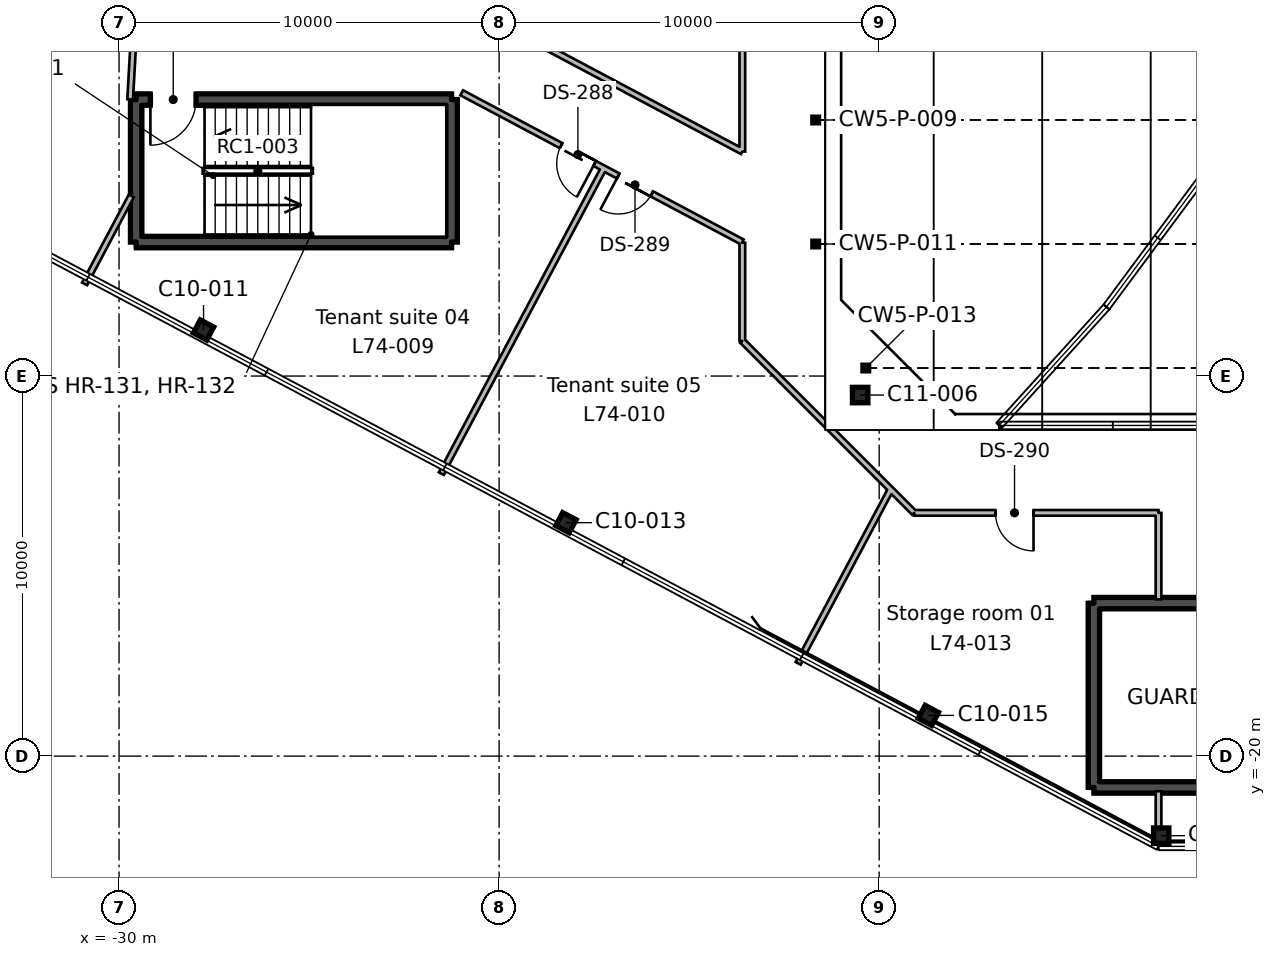
"""IFC4 building model, lengths in metres.
Left out: names, types, materials, properties, quantities, classifications, styles, units other than length and angle.
Written with IfcOpenShell. Run it as: python <this file> out.ifc"""

import sys

from ifc_helpers import new_model, si_unit, direction, frame, frame_2d, origin, origin_2d, place, context, subcontext, project, spatial, rectangle, hollow_rectangle, i_section, extrude, element, fill, save


model = new_model("IFC4")
c1 = context("Model", 3, precision=1e-05, world=origin(), true_north=direction((0.0, 1.0)))
c2 = subcontext(c1, "Body", "Model", "MODEL_VIEW")
j1 = project(units=[si_unit("LENGTHUNIT", "METRE"), si_unit("PLANEANGLEUNIT", "RADIAN")], contexts=[c1])
p1 = place(None, origin())
s1 = spatial("IfcSite", under=j1, at=p1, CompositionType="ELEMENT")
p2 = place(p1, origin())
s2 = spatial("IfcBuilding", under=s1, at=p2, CompositionType="ELEMENT")
p3 = place(p2, frame((0.0, 0.0, 324.3)))
s3 = spatial("IfcBuildingStorey", under=s2, at=p3, CompositionType="ELEMENT", Elevation=324.3)
p4 = place(p3, frame((-2.579, -22.094, 0.0), z_axis=(0.0, 0.0, 1.0), x_axis=(1.0, 0.0, 0.0)))
e1 = element("IfcColumn", 1, at=p4, inside=s3, PredefinedType="COLUMN", context=c2, shape_type="SweptSolid", body=[
    extrude(i_section(OverallWidth=0.404, OverallDepth=0.406, WebThickness=0.027, FlangeThickness=0.044, FilletRadius=0.015, at=origin_2d()), origin(), (0.0, 0.0, 1.0), 3.9),
])
for number, where, z_axis, x_axis in (
    (2, (-8.705, -18.929, 0.0), (0.0, 0.0, 1.0), (0.883, -0.469, 0.0)),
    (3, (-18.241, -13.858, 0.0), (0.0, 0.0, 1.0), (0.883, -0.469, 0.0)),
):
    element("IfcColumn", number, at=place(p3, frame(where, z_axis=z_axis, x_axis=x_axis)), inside=s3, PredefinedType="COLUMN", context=c2, shape_type="SweptSolid", body=[
        extrude(i_section(OverallWidth=0.399, OverallDepth=0.386, WebThickness=0.021, FlangeThickness=0.033, FilletRadius=0.015, at=origin_2d()), origin(), (0.0, 0.0, 1.0), 3.9),
    ])
p5 = place(p3, frame((-10.5, -10.5, 0.0), z_axis=(0.0, 0.0, 1.0), x_axis=(1.0, 0.0, 0.0)))
e4 = element("IfcColumn", 4, at=p5, inside=s3, PredefinedType="COLUMN", context=c2, shape_type="SweptSolid", body=[
    extrude(hollow_rectangle(XDim=0.406, YDim=0.406, WallThickness=0.009, InnerFilletRadius=0.004, OuterFilletRadius=0.013, at=origin_2d()), origin(), (0.0, 0.0, 1.0), 3.9),
])
p6 = place(p3, frame((-27.777, -8.788, 0.0), z_axis=(0.0, 0.0, 1.0), x_axis=(0.882947592859, -0.469471562786, 0.0)))
e5 = element("IfcColumn", 5, at=p6, inside=s3, PredefinedType="COLUMN", context=c2, shape_type="SweptSolid", body=[
    extrude(i_section(OverallWidth=0.399, OverallDepth=0.386, WebThickness=0.021, FlangeThickness=0.033, FilletRadius=0.015, at=origin_2d()), origin(), (0.0, 0.0, 1.0), 3.9),
])
p7 = place(p3, frame((3.95, -20.825, 0.0), z_axis=(0.0, 0.0, 1.0), x_axis=(-1.0, 0.0, 0.0)))
e6 = element("IfcWall", 6, at=p7, inside=s3, PredefinedType="SHEAR", context=c2, shape_type="SweptSolid", body=[
    extrude(rectangle(XDim=8.3, YDim=0.3, at=frame_2d((4.15, 0.0))), origin(), (0.0, 0.0, 1.0), 3.9),
])
p8 = place(p3, frame((-4.35, -20.825, 0.0), z_axis=(0.0, 0.0, 1.0), x_axis=(0.0, 1.0, 0.0)))
e7 = element("IfcWall", 7, at=p8, inside=s3, PredefinedType="SHEAR", context=c2, shape_type="SweptSolid", body=[
    extrude(rectangle(XDim=4.85, YDim=0.3, at=frame_2d((2.425, 0.0))), origin(), (0.0, 0.0, 1.0), 3.9),
])
p9 = place(p3, frame((-4.35, -15.975, 0.0), z_axis=(0.0, 0.0, 1.0), x_axis=(1.0, 0.0, 0.0)))
e8 = element("IfcWall", 8, at=p9, inside=s3, PredefinedType="SHEAR", context=c2, shape_type="SweptSolid", body=[
    extrude(rectangle(XDim=8.3, YDim=0.3, at=frame_2d((4.15, 0.0))), origin(), (0.0, 0.0, 1.0), 3.9),
])
p10 = place(p9, frame((6.05, 0.0, 0.0)))
e9 = element("IfcOpeningElement", 9, at=p10, cuts=e8, PredefinedType="OPENING", context=c2, shape_type="SweptSolid", body=[
    extrude(rectangle(XDim=1.9, YDim=2.1, at=frame_2d((0.95, 1.05))), frame((0.0, 0.16, 0.0), z_axis=(0.0, -1.0, 0.0), x_axis=(1.0, 0.0, 0.0)), (0.0, 0.0, 1.0), 0.32),
])
p11 = place(p3, frame((-21.25, -2.725, 0.0), z_axis=(0.0, 0.0, 1.0), x_axis=(0.0, -1.0, 0.0)))
e10 = element("IfcWall", 10, at=p11, inside=s3, PredefinedType="SHEAR", context=c2, shape_type="SweptSolid", body=[
    extrude(rectangle(XDim=3.75, YDim=0.3, at=frame_2d((1.875, 0.0))), origin(), (0.0, 0.0, 1.0), 3.9),
])
p12 = place(p3, frame((-21.25, -6.475, 0.0), z_axis=(0.0, 0.0, 1.0), x_axis=(-1.0, 0.0, 0.0)))
e11 = element("IfcWall", 11, at=p12, inside=s3, PredefinedType="SHEAR", context=c2, shape_type="SweptSolid", body=[
    extrude(rectangle(XDim=8.3, YDim=0.3, at=frame_2d((4.15, 0.0))), origin(), (0.0, 0.0, 1.0), 3.9),
])
p13 = place(p3, frame((-29.55, -6.475, 0.0), z_axis=(0.0, 0.0, 1.0), x_axis=(0.0, 1.0, 0.0)))
e12 = element("IfcWall", 12, at=p13, inside=s3, PredefinedType="SHEAR", context=c2, shape_type="SweptSolid", body=[
    extrude(rectangle(XDim=3.75, YDim=0.3, at=frame_2d((1.875, 0.0))), origin(), (0.0, 0.0, 1.0), 3.9),
])
p14 = place(p3, frame((-29.55, -2.725, 0.0), z_axis=(0.0, 0.0, 1.0), x_axis=(1.0, 0.0, 0.0)))
e13 = element("IfcWall", 13, at=p14, inside=s3, PredefinedType="SHEAR", context=c2, shape_type="SweptSolid", body=[
    extrude(rectangle(XDim=8.3, YDim=0.3, at=frame_2d((4.15, 0.0))), origin(), (0.0, 0.0, 1.0), 3.9),
])
p15 = place(p14, frame((0.375, 0.0, 0.0)))
e14 = element("IfcOpeningElement", 14, at=p15, cuts=e13, PredefinedType="OPENING", context=c2, shape_type="SweptSolid", body=[
    extrude(rectangle(XDim=1.2, YDim=2.1, at=frame_2d((0.6, 1.05))), frame((0.0, 0.16, 0.0), z_axis=(0.0, -1.0, 0.0), x_axis=(1.0, 0.0, 0.0)), (0.0, 0.0, 1.0), 0.32),
])
p16 = place(p3, frame((8.042, -11.1, 3.9), z_axis=(0.0, 0.0, 1.0), x_axis=(-1.0, 0.0, 0.0)))
e15 = element("IfcWall", 15, at=p16, inside=s3, PredefinedType="STANDARD", context=c2, shape_type="SweptSolid", body=[
    extrude(rectangle(XDim=14.435, YDim=0.2, at=frame_2d((7.217, 0.0))), origin(), (0.0, 0.0, 1.0), 1.1),
])
p17 = place(p3, frame((-6.393, -11.1, 3.9), z_axis=(0.0, 0.0, 1.0), x_axis=(0.671536110708, 0.740971829434, 0.0)))
e16 = element("IfcWall", 16, at=p17, inside=s3, PredefinedType="STANDARD", context=c2, shape_type="SweptSolid", body=[
    extrude(rectangle(XDim=3.766, YDim=0.2, at=frame_2d((1.883, 0.0))), origin(), (0.0, 0.0, 1.0), 1.1),
])
p18 = place(p3, frame((-3.865, -8.31, 3.9), z_axis=(0.0, 0.0, 1.0), x_axis=(0.595701892523, 0.80320561206, 0.0)))
e17 = element("IfcWall", 17, at=p18, inside=s3, PredefinedType="STANDARD", context=c2, shape_type="SweptSolid", body=[
    extrude(rectangle(XDim=4.553, YDim=0.2, at=frame_2d((2.277, 0.0))), origin(), (0.0, 0.0, 1.0), 1.1),
])
for number, where, z_axis, x_axis in (
    (18, (-10.351, -9.789, 3.9), (0.0, 0.0, 1.0), (1.0, 0.0, 0.0)),
    (19, (-11.67, -6.526, 3.9), (0.0, 0.0, 1.0), (1.0, 0.0, 0.0)),
    (20, (-11.67, -3.263, 3.9), (0.0, 0.0, 1.0), (1.0, 0.0, 0.0)),
):
    element("IfcColumn", number, at=place(p3, frame(where, z_axis=z_axis, x_axis=x_axis)), inside=s3, PredefinedType="COLUMN", context=c2, shape_type="SweptSolid", body=[
        extrude(hollow_rectangle(XDim=0.15, YDim=0.15, WallThickness=0.008, InnerFilletRadius=0.004, OuterFilletRadius=0.012, at=origin_2d()), origin(), (0.0, 0.0, 1.0), 2.45),
    ])
p19 = place(p3, frame((-29.677, -5.259, 0.0), z_axis=(0.0, 0.0, 1.0), x_axis=(-0.469186976584, -0.883098851207, 0.0)))
e21 = element("IfcWall", 21, at=p19, inside=s3, PredefinedType="PARTITIONING", context=c2, shape_type="SweptSolid", body=[
    extrude(rectangle(XDim=2.624, YDim=0.15, at=frame_2d((1.312, 0.0))), origin(), (0.0, 0.0, 1.0), 3.5),
])
p20 = place(p3, frame((-29.708, -2.721, 0.0), z_axis=(0.0, 0.0, 1.0), x_axis=(0.056209208886, 0.998419012658, 0.0)))
e22 = element("IfcWall", 22, at=p20, inside=s3, PredefinedType="PARTITIONING", context=c2, shape_type="SweptSolid", body=[
    extrude(rectangle(XDim=4.152, YDim=0.15, at=frame_2d((2.076, 0.0))), origin(), (0.0, 0.0, 1.0), 3.5),
])
p21 = place(p3, frame((-17.248, -4.533, 0.0), z_axis=(0.0, 0.0, 1.0), x_axis=(-0.46943766298, -0.882965616871, 0.0)))
e23 = element("IfcWall", 23, at=p21, inside=s3, PredefinedType="PARTITIONING", context=c2, shape_type="SweptSolid", body=[
    extrude(rectangle(XDim=9.1, YDim=0.15, at=frame_2d((4.55, 0.0))), origin(), (0.0, 0.0, 1.0), 3.5),
])
p22 = place(p3, frame((-13.6, -6.473, 0.0), z_axis=(0.0, 0.0, 1.0), x_axis=(-0.882934197132, 0.469496755618, 0.0)))
e24 = element("IfcWall", 24, at=p22, inside=s3, PredefinedType="PARTITIONING", context=c2, shape_type="SweptSolid", body=[
    extrude(rectangle(XDim=8.362, YDim=0.15, at=frame_2d((4.181, 0.0))), origin(), (0.0, 0.0, 1.0), 3.5),
])
p23 = place(p22, frame((4.4, 0.0, 0.0)))
e25 = element("IfcOpeningElement", 25, at=p23, cuts=e24, PredefinedType="OPENING", context=c2, shape_type="SweptSolid", body=[
    extrude(rectangle(XDim=1.0, YDim=2.1, at=frame_2d((0.5, 1.05))), frame((0.0, 0.085, 0.0), z_axis=(0.0, -1.0, 0.0), x_axis=(1.0, 0.0, 0.0)), (0.0, 0.0, 1.0), 0.17),
])
p24 = place(p22, frame((2.699, 0.0, 0.0)))
e26 = element("IfcOpeningElement", 26, at=p24, cuts=e24, PredefinedType="OPENING", context=c2, shape_type="SweptSolid", body=[
    extrude(rectangle(XDim=1.0, YDim=2.1, at=frame_2d((0.5, 1.05))), frame((0.0, 0.085, 0.0), z_axis=(0.0, -1.0, 0.0), x_axis=(1.0, 0.0, 0.0)), (0.0, 0.0, 1.0), 0.17),
])
p25 = place(p3, frame((-9.661, -13.016, 0.0), z_axis=(0.0, 0.0, 1.0), x_axis=(-0.707106781187, 0.707106781187, 0.0)))
e27 = element("IfcWall", 27, at=p25, inside=s3, PredefinedType="PARTITIONING", context=c2, shape_type="SweptSolid", body=[
    extrude(rectangle(XDim=5.571, YDim=0.15, at=frame_2d((2.785, 0.0))), origin(), (0.0, 0.0, 1.0), 3.5),
])
p26 = place(p3, frame((-13.6, -9.077, 0.0), z_axis=(0.0, 0.0, 1.0), x_axis=(0.0, 1.0, 0.0)))
e28 = element("IfcWall", 28, at=p26, inside=s3, PredefinedType="PARTITIONING", context=c2, shape_type="SweptSolid", body=[
    extrude(rectangle(XDim=2.586, YDim=0.15, at=frame_2d((1.293, 0.0))), origin(), (0.0, 0.0, 1.0), 3.5),
])
p27 = place(p3, frame((-9.696, -12.981, 0.0), z_axis=(0.0, 0.0, 1.0), x_axis=(-0.469664493403, -0.882844982789, 0.0)))
e29 = element("IfcWall", 29, at=p27, inside=s3, PredefinedType="PARTITIONING", context=c2, shape_type="SweptSolid", body=[
    extrude(rectangle(XDim=5.187, YDim=0.15, at=frame_2d((2.593, 0.0))), origin(), (0.0, 0.0, 1.0), 3.5),
])
p28 = place(p3, frame((-3.888, -13.6, 0.0), z_axis=(0.0, 0.0, 1.0), x_axis=(-1.0, 0.0, 0.0)))
e30 = element("IfcWall", 30, at=p28, inside=s3, PredefinedType="PARTITIONING", context=c2, shape_type="SweptSolid", body=[
    extrude(rectangle(XDim=5.189, YDim=0.15, at=frame_2d((2.594, 0.0))), origin(), (0.0, 0.0, 1.0), 3.5),
])
p29 = place(p28, frame((2.05, 0.0, 0.0)))
e31 = element("IfcOpeningElement", 31, at=p29, cuts=e30, PredefinedType="OPENING", context=c2, shape_type="SweptSolid", body=[
    extrude(rectangle(XDim=1.0, YDim=2.1, at=frame_2d((0.5, 1.05))), frame((0.0, 0.085, 0.0), z_axis=(0.0, -1.0, 0.0), x_axis=(1.0, 0.0, 0.0)), (0.0, 0.0, 1.0), 0.17),
])
p30 = place(p3, frame((-9.077, -13.6, 0.0), z_axis=(0.0, 0.0, 1.0), x_axis=(-0.707106781187, 0.707106781187, 0.0)))
e32 = element("IfcWall", 32, at=p30, inside=s3, PredefinedType="PARTITIONING", context=c2, shape_type="SweptSolid", body=[
    extrude(rectangle(XDim=0.871, YDim=0.15, at=frame_2d((0.436, 0.0))), origin(), (0.0, 0.0, 1.0), 3.5),
])
p31 = place(p3, frame((-2.649, -15.875, 0.0), z_axis=(0.0, 0.0, 1.0), x_axis=(0.0, 1.0, 0.0)))
e33 = element("IfcWall", 33, at=p31, inside=s3, PredefinedType="PARTITIONING", context=c2, shape_type="SweptSolid", body=[
    extrude(rectangle(XDim=2.275, YDim=0.15, at=frame_2d((1.137, 0.0))), origin(), (0.0, 0.0, 1.0), 3.5),
])
p32 = place(p3, frame((-2.649, -13.6, 0.0), z_axis=(0.0, 0.0, 1.0), x_axis=(-1.0, 0.0, 0.0)))
e34 = element("IfcWall", 34, at=p32, inside=s3, PredefinedType="PARTITIONING", context=c2, shape_type="SweptSolid", body=[
    extrude(rectangle(XDim=1.239, YDim=0.15, at=frame_2d((0.62, 0.0))), origin(), (0.0, 0.0, 1.0), 3.5),
])
p33 = place(p3, frame((-2.649, -20.925, 0.0), z_axis=(0.0, 0.0, 1.0), x_axis=(0.0, -1.0, 0.0)))
e35 = element("IfcWall", 35, at=p33, inside=s3, PredefinedType="PARTITIONING", context=c2, shape_type="SweptSolid", body=[
    extrude(rectangle(XDim=0.966, YDim=0.15, at=frame_2d((0.483, 0.0))), origin(), (0.0, 0.0, 1.0), 3.5),
])
p34 = place(p3, frame((-13.6, 9.077, 0.0), z_axis=(0.0, 0.0, 1.0), x_axis=(0.0, -1.0, 0.0)))
e36 = element("IfcWall", 36, at=p34, inside=s3, PredefinedType="PARTITIONING", context=c2, shape_type="SweptSolid", body=[
    extrude(rectangle(XDim=13.171, YDim=0.15, at=frame_2d((6.585, 0.0))), origin(), (0.0, 0.0, 1.0), 3.5),
])
p35 = place(p3, frame((-13.6, -4.094, 0.0), z_axis=(0.0, 0.0, 1.0), x_axis=(-0.882967890474, 0.469433386533, 0.0)))
e37 = element("IfcWall", 37, at=p35, inside=s3, PredefinedType="PARTITIONING", context=c2, shape_type="SweptSolid", body=[
    extrude(rectangle(XDim=7.914, YDim=0.15, at=frame_2d((3.957, 0.0))), origin(), (0.0, 0.0, 1.0), 3.5),
])
p36 = place(p15, frame((1.2, 0.0, 0.0), z_axis=(0.0, 0.0, 1.0), x_axis=(-1.0, 0.0, 0.0)))
e38 = element("IfcDoor", 38, at=p36, inside=s3, OperationType="SINGLE_SWING_RIGHT", PredefinedType="DOOR", context=c2, shape_type="SweptSolid", body=[
    extrude(rectangle(XDim=1.2, YDim=2.1, at=frame_2d((0.6, 1.05))), frame((0.0, 0.025, 0.0), z_axis=(0.0, -1.0, 0.0), x_axis=(1.0, 0.0, 0.0)), (0.0, 0.0, 1.0), 0.05),
])
fill(e14, e38)
p37 = place(p23, origin())
e39 = element("IfcDoor", 39, at=p37, inside=s3, OperationType="SINGLE_SWING_LEFT", PredefinedType="DOOR", context=c2, shape_type="SweptSolid", body=[
    extrude(rectangle(XDim=1.0, YDim=2.1, at=frame_2d((0.5, 1.05))), frame((0.0, 0.025, 0.0), z_axis=(0.0, -1.0, 0.0), x_axis=(1.0, 0.0, 0.0)), (0.0, 0.0, 1.0), 0.05),
])
fill(e25, e39)
p38 = place(p24, origin())
e40 = element("IfcDoor", 40, at=p38, inside=s3, OperationType="SINGLE_SWING_RIGHT", PredefinedType="DOOR", context=c2, shape_type="SweptSolid", body=[
    extrude(rectangle(XDim=1.0, YDim=2.1, at=frame_2d((0.5, 1.05))), frame((0.0, 0.025, 0.0), z_axis=(0.0, -1.0, 0.0), x_axis=(1.0, 0.0, 0.0)), (0.0, 0.0, 1.0), 0.05),
])
fill(e26, e40)
p39 = place(p29, origin())
e41 = element("IfcDoor", 41, at=p39, inside=s3, OperationType="SINGLE_SWING_LEFT", PredefinedType="DOOR", context=c2, shape_type="SweptSolid", body=[
    extrude(rectangle(XDim=1.0, YDim=2.1, at=frame_2d((0.5, 1.05))), frame((0.0, 0.025, 0.0), z_axis=(0.0, -1.0, 0.0), x_axis=(1.0, 0.0, 0.0)), (0.0, 0.0, 1.0), 0.05),
])
fill(e31, e41)
save(model, sys.argv[1])
